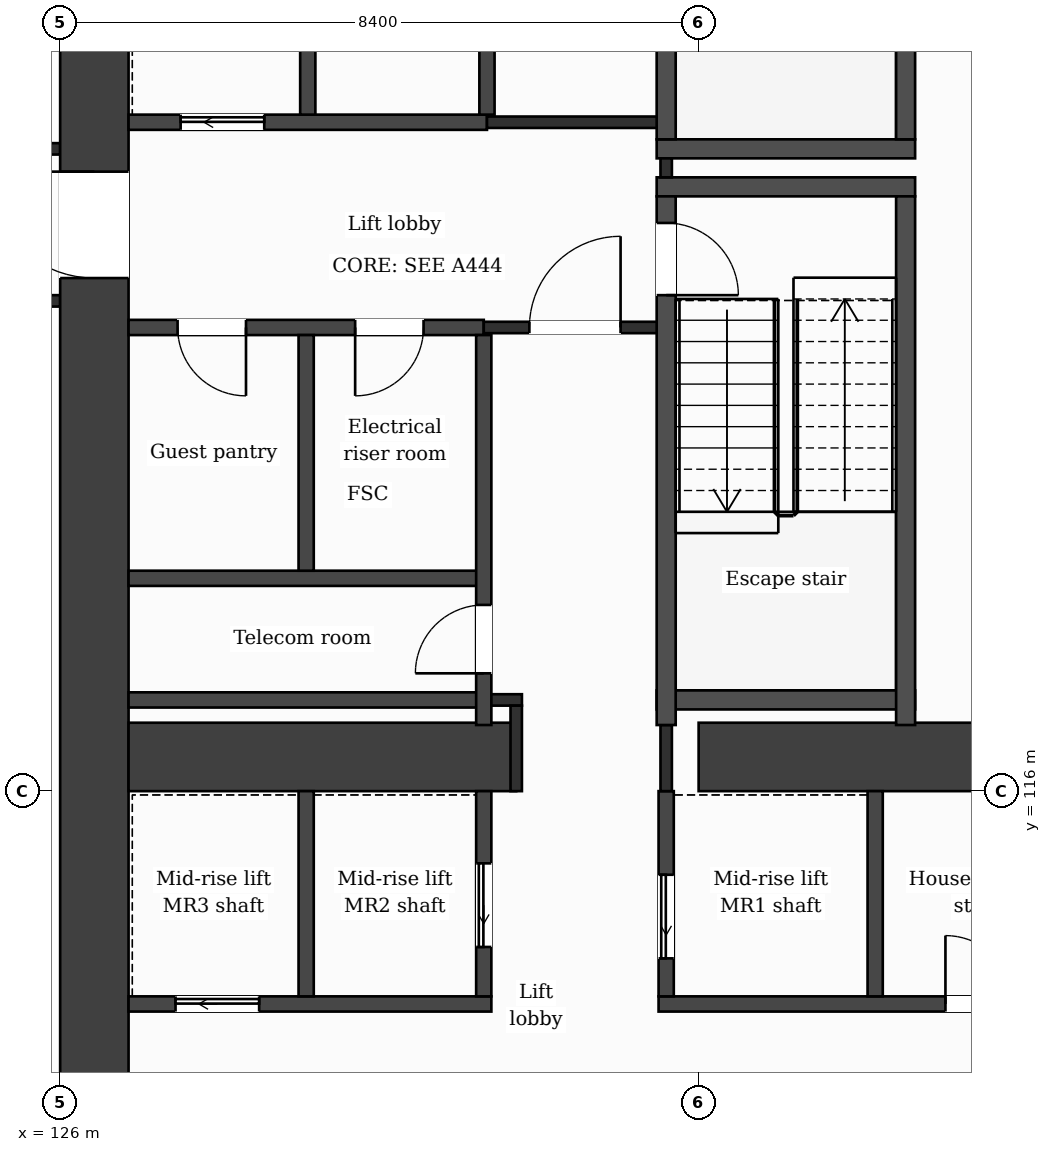
"""IFC4 building model, lengths in metres.
Left out: names, types, materials, properties, quantities, classifications, styles, units other than length and angle.
Written with IfcOpenShell. Run it as: python <this file> out.ifc"""

import sys

from ifc_helpers import new_model, si_unit, direction, frame, frame_2d, origin, place, context, subcontext, project, spatial, rectangle, extrude, element, fill, save


model = new_model("IFC4")
c1 = context("Model", 3, precision=1e-05, world=origin(), true_north=direction((0.0, 1.0)))
c2 = subcontext(c1, "Body", "Model", "MODEL_VIEW")
j1 = project(units=[si_unit("LENGTHUNIT", "METRE"), si_unit("PLANEANGLEUNIT", "RADIAN")], contexts=[c1])
p1 = place(None, origin())
s1 = spatial("IfcSite", under=j1, at=p1, CompositionType="ELEMENT")
p2 = place(p1, origin())
s2 = spatial("IfcBuilding", under=s1, at=p2, CompositionType="ELEMENT")
p3 = place(p2, frame((0.0, 0.0, 181.1)))
s3 = spatial("IfcBuildingStorey", under=s2, at=p3, CompositionType="ELEMENT", Elevation=181.1)
p4 = place(p3, frame((137.776, 131.95, 0.0), z_axis=(0.0, 0.0, 1.0), x_axis=(0.133421759112, -0.991059349482, 0.0)))
e1 = element("IfcWall", 1, at=p4, inside=s3, PredefinedType="SHEAR", context=c2, shape_type="SweptSolid", body=[
    extrude(rectangle(XDim=21.29, YDim=0.9, at=frame_2d((10.645, 0.0))), origin(), (0.0, 0.0, 1.0), 3.7),
])
p5 = place(p3, frame((126.45, 110.85, 0.0), z_axis=(0.0, 0.0, 1.0), x_axis=(0.0, 1.0, 0.0)))
e2 = element("IfcWall", 2, at=p5, inside=s3, PredefinedType="SHEAR", context=c2, shape_type="SweptSolid", body=[
    extrude(rectangle(XDim=21.1, YDim=0.9, at=frame_2d((10.55, 0.0))), origin(), (0.0, 0.0, 1.0), 3.7),
])
p6 = place(p5, frame((11.9, 0.0, 0.0)))
e3 = element("IfcOpeningElement", 3, at=p6, cuts=e2, PredefinedType="OPENING", context=c2, shape_type="SweptSolid", body=[
    extrude(rectangle(XDim=1.4, YDim=2.1, at=frame_2d((0.7, 1.05))), frame((0.0, 0.46, 0.0), z_axis=(0.0, -1.0, 0.0), x_axis=(1.0, 0.0, 0.0)), (0.0, 0.0, 1.0), 0.92),
])
p7 = place(p3, frame((126.9, 116.45, 0.0), z_axis=(0.0, 0.0, 1.0), x_axis=(1.0, 0.0, 0.0)))
e4 = element("IfcWall", 4, at=p7, inside=s3, PredefinedType="SHEAR", context=c2, shape_type="SweptSolid", body=[
    extrude(rectangle(XDim=5.1, YDim=0.9, at=frame_2d((2.55, 0.0))), origin(), (0.0, 0.0, 1.0), 3.7),
])
p8 = place(p3, frame((134.4, 116.45, 0.0), z_axis=(0.0, 0.0, 1.0), x_axis=(1.0, 0.0, 0.0)))
e5 = element("IfcWall", 5, at=p8, inside=s3, PredefinedType="SHEAR", context=c2, shape_type="SweptSolid", body=[
    extrude(rectangle(XDim=5.077, YDim=0.9, at=frame_2d((2.539, 0.0))), origin(), (0.0, 0.0, 1.0), 3.7),
])
p9 = place(p3, frame((126.9, 113.2, 0.0), z_axis=(0.0, 0.0, 1.0), x_axis=(1.0, 0.0, 0.0)))
e6 = element("IfcWall", 6, at=p9, inside=s3, PredefinedType="PARTITIONING", context=c2, shape_type="SweptSolid", body=[
    extrude(rectangle(XDim=4.773, YDim=0.2, at=frame_2d((2.387, 0.0))), origin(), (0.0, 0.0, 1.0), 3.38),
])
p10 = place(p9, frame((0.618, 0.0, 0.0)))
e7 = element("IfcOpeningElement", 7, at=p10, cuts=e6, PredefinedType="OPENING", context=c2, shape_type="SweptSolid", body=[
    extrude(rectangle(XDim=1.1, YDim=2.1, at=frame_2d((0.55, 1.05))), frame((0.0, 0.11, 0.0), z_axis=(0.0, -1.0, 0.0), x_axis=(1.0, 0.0, 0.0)), (0.0, 0.0, 1.0), 0.22),
])
p11 = place(p3, frame((133.873, 113.2, 0.0), z_axis=(0.0, 0.0, 1.0), x_axis=(1.0, 0.0, 0.0)))
e8 = element("IfcWall", 8, at=p11, inside=s3, PredefinedType="PARTITIONING", context=c2, shape_type="SweptSolid", body=[
    extrude(rectangle(XDim=6.003, YDim=0.2, at=frame_2d((3.001, 0.0))), origin(), (0.0, 0.0, 1.0), 3.38),
])
p12 = place(p11, frame((3.774, 0.0, 0.0)))
e9 = element("IfcOpeningElement", 9, at=p12, cuts=e8, PredefinedType="OPENING", context=c2, shape_type="SweptSolid", body=[
    extrude(rectangle(XDim=0.9, YDim=2.1, at=frame_2d((0.45, 1.05))), frame((0.0, 0.11, 0.0), z_axis=(0.0, -1.0, 0.0), x_axis=(1.0, 0.0, 0.0)), (0.0, 0.0, 1.0), 0.22),
])
p13 = place(p3, frame((126.9, 117.2, 0.0), z_axis=(0.0, 0.0, 1.0), x_axis=(1.0, 0.0, 0.0)))
e10 = element("IfcWall", 10, at=p13, inside=s3, PredefinedType="PARTITIONING", context=c2, shape_type="SweptSolid", body=[
    extrude(rectangle(XDim=4.673, YDim=0.2, at=frame_2d((2.336, 0.0))), origin(), (0.0, 0.0, 1.0), 3.38),
])
p14 = place(p3, frame((131.573, 117.2, 0.0), z_axis=(0.0, 0.0, 1.0), x_axis=(1.0, 0.0, 0.0)))
e11 = element("IfcWall", 11, at=p14, inside=s3, PredefinedType="PARTITIONING", context=c2, shape_type="SweptSolid", body=[
    extrude(rectangle(XDim=0.502, YDim=0.15, at=frame_2d((0.251, 0.0))), origin(), (0.0, 0.0, 1.0), 3.38),
])
p15 = place(p3, frame((133.848, 117.2, 0.0), z_axis=(0.0, 0.0, 1.0), x_axis=(1.0, 0.0, 0.0)))
e12 = element("IfcWall", 12, at=p15, inside=s3, PredefinedType="PARTITIONING", context=c2, shape_type="SweptSolid", body=[
    extrude(rectangle(XDim=3.4, YDim=0.25, at=frame_2d((1.7, 0.0))), origin(), (0.0, 0.0, 1.0), 3.38),
])
p16 = place(p3, frame((126.9, 118.8, 0.0), z_axis=(0.0, 0.0, 1.0), x_axis=(1.0, 0.0, 0.0)))
e13 = element("IfcWall", 13, at=p16, inside=s3, PredefinedType="PARTITIONING", context=c2, shape_type="SweptSolid", body=[
    extrude(rectangle(XDim=4.673, YDim=0.2, at=frame_2d((2.336, 0.0))), origin(), (0.0, 0.0, 1.0), 3.38),
])
p17 = place(p3, frame((126.9, 122.1, 0.0), z_axis=(0.0, 0.0, 1.0), x_axis=(1.0, 0.0, 0.0)))
e14 = element("IfcWall", 14, at=p17, inside=s3, PredefinedType="PARTITIONING", context=c2, shape_type="SweptSolid", body=[
    extrude(rectangle(XDim=4.673, YDim=0.2, at=frame_2d((2.336, 0.0))), origin(), (0.0, 0.0, 1.0), 3.38),
])
p18 = place(p17, frame((2.981, 0.0, 0.0)))
e15 = element("IfcOpeningElement", 15, at=p18, cuts=e14, PredefinedType="OPENING", context=c2, shape_type="SweptSolid", body=[
    extrude(rectangle(XDim=0.9, YDim=2.1, at=frame_2d((0.45, 1.05))), frame((0.0, 0.11, 0.0), z_axis=(0.0, -1.0, 0.0), x_axis=(1.0, 0.0, 0.0)), (0.0, 0.0, 1.0), 0.22),
])
p19 = place(p17, frame((0.645, 0.0, 0.0)))
e16 = element("IfcOpeningElement", 16, at=p19, cuts=e14, PredefinedType="OPENING", context=c2, shape_type="SweptSolid", body=[
    extrude(rectangle(XDim=0.9, YDim=2.1, at=frame_2d((0.45, 1.05))), frame((0.0, 0.11, 0.0), z_axis=(0.0, -1.0, 0.0), x_axis=(1.0, 0.0, 0.0)), (0.0, 0.0, 1.0), 0.22),
])
p20 = place(p3, frame((131.573, 122.1, 0.0), z_axis=(0.0, 0.0, 1.0), x_axis=(1.0, 0.0, 0.0)))
e17 = element("IfcWall", 17, at=p20, inside=s3, PredefinedType="PARTITIONING", context=c2, shape_type="SweptSolid", body=[
    extrude(rectangle(XDim=2.4, YDim=0.15, at=frame_2d((1.2, 0.0))), origin(), (0.0, 0.0, 1.0), 3.38),
])
p21 = place(p20, frame((0.6, 0.0, 0.0)))
e18 = element("IfcOpeningElement", 18, at=p21, cuts=e17, PredefinedType="OPENING", context=c2, shape_type="SweptSolid", body=[
    extrude(rectangle(XDim=1.2, YDim=2.1, at=frame_2d((0.6, 1.05))), frame((0.0, 0.085, 0.0), z_axis=(0.0, -1.0, 0.0), x_axis=(1.0, 0.0, 0.0)), (0.0, 0.0, 1.0), 0.17),
])
p22 = place(p3, frame((100.8, 122.45, 0.0), z_axis=(0.0, 0.0, 1.0), x_axis=(1.0, 0.0, 0.0)))
e19 = element("IfcWall", 19, at=p22, inside=s3, PredefinedType="PARTITIONING", context=c2, shape_type="SweptSolid", body=[
    extrude(rectangle(XDim=25.2, YDim=0.15, at=frame_2d((12.6, 0.0))), origin(), (0.0, 0.0, 1.0), 3.38),
])
for number, where, z_axis, x_axis in (
    (20, (133.848, 123.95, 0.0), (0.0, 0.0, 1.0), (1.0, 0.0, 0.0)),
    (21, (133.848, 124.45, 0.0), (0.0, 0.0, 1.0), (1.0, 0.0, 0.0)),
):
    element("IfcWall", number, at=place(p3, frame(where, z_axis=z_axis, x_axis=x_axis)), inside=s3, PredefinedType="PARTITIONING", context=c2, shape_type="SweptSolid", body=[
        extrude(rectangle(XDim=3.4, YDim=0.25, at=frame_2d((1.7, 0.0))), origin(), (0.0, 0.0, 1.0), 3.38),
    ])
p23 = place(p3, frame((100.8, 124.45, 0.0), z_axis=(0.0, 0.0, 1.0), x_axis=(1.0, 0.0, 0.0)))
e22 = element("IfcWall", 22, at=p23, inside=s3, PredefinedType="PARTITIONING", context=c2, shape_type="SweptSolid", body=[
    extrude(rectangle(XDim=25.2, YDim=0.15, at=frame_2d((12.6, 0.0))), origin(), (0.0, 0.0, 1.0), 3.38),
])
p24 = place(p23, frame((0.975, 0.0, 0.0)))
e23 = element("IfcOpeningElement", 23, at=p24, cuts=e22, PredefinedType="OPENING", context=c2, shape_type="SweptSolid", body=[
    extrude(rectangle(XDim=1.0, YDim=2.1, at=frame_2d((0.5, 1.05))), frame((0.0, 0.085, 0.0), z_axis=(0.0, -1.0, 0.0), x_axis=(1.0, 0.0, 0.0)), (0.0, 0.0, 1.0), 0.17),
])
p25 = place(p23, frame((6.05, 0.0, 0.0)))
e24 = element("IfcOpeningElement", 24, at=p25, cuts=e22, PredefinedType="OPENING", context=c2, shape_type="SweptSolid", body=[
    extrude(rectangle(XDim=1.0, YDim=2.1, at=frame_2d((0.5, 1.05))), frame((0.0, 0.085, 0.0), z_axis=(0.0, -1.0, 0.0), x_axis=(1.0, 0.0, 0.0)), (0.0, 0.0, 1.0), 0.17),
])
p26 = place(p23, frame((9.27, 0.0, 0.0)))
e25 = element("IfcOpeningElement", 25, at=p26, cuts=e22, PredefinedType="OPENING", context=c2, shape_type="SweptSolid", body=[
    extrude(rectangle(XDim=1.0, YDim=2.1, at=frame_2d((0.5, 1.05))), frame((0.0, 0.085, 0.0), z_axis=(0.0, -1.0, 0.0), x_axis=(1.0, 0.0, 0.0)), (0.0, 0.0, 1.0), 0.17),
])
p27 = place(p23, frame((14.2, 0.0, 0.0)))
e26 = element("IfcOpeningElement", 26, at=p27, cuts=e22, PredefinedType="OPENING", context=c2, shape_type="SweptSolid", body=[
    extrude(rectangle(XDim=1.0, YDim=2.1, at=frame_2d((0.5, 1.05))), frame((0.0, 0.085, 0.0), z_axis=(0.0, -1.0, 0.0), x_axis=(1.0, 0.0, 0.0)), (0.0, 0.0, 1.0), 0.17),
])
p28 = place(p23, frame((18.825, 0.0, 0.0)))
e27 = element("IfcOpeningElement", 27, at=p28, cuts=e22, PredefinedType="OPENING", context=c2, shape_type="SweptSolid", body=[
    extrude(rectangle(XDim=1.0, YDim=2.1, at=frame_2d((0.5, 1.05))), frame((0.0, 0.085, 0.0), z_axis=(0.0, -1.0, 0.0), x_axis=(1.0, 0.0, 0.0)), (0.0, 0.0, 1.0), 0.17),
])
p29 = place(p3, frame((126.9, 124.8, 0.0), z_axis=(0.0, 0.0, 1.0), x_axis=(1.0, 0.0, 0.0)))
e28 = element("IfcWall", 28, at=p29, inside=s3, PredefinedType="PARTITIONING", context=c2, shape_type="SweptSolid", body=[
    extrude(rectangle(XDim=4.715, YDim=0.2, at=frame_2d((2.358, 0.0))), origin(), (0.0, 0.0, 1.0), 3.38),
])
p30 = place(p29, frame((0.685, 0.0, 0.0)))
e29 = element("IfcOpeningElement", 29, at=p30, cuts=e28, PredefinedType="OPENING", context=c2, shape_type="SweptSolid", body=[
    extrude(rectangle(XDim=1.1, YDim=2.1, at=frame_2d((0.55, 1.05))), frame((0.0, 0.11, 0.0), z_axis=(0.0, -1.0, 0.0), x_axis=(1.0, 0.0, 0.0)), (0.0, 0.0, 1.0), 0.22),
])
p31 = place(p3, frame((131.615, 124.8, 0.0), z_axis=(0.0, 0.0, 1.0), x_axis=(1.0, 0.0, 0.0)))
e30 = element("IfcWall", 30, at=p31, inside=s3, PredefinedType="PARTITIONING", context=c2, shape_type="SweptSolid", body=[
    extrude(rectangle(XDim=2.483, YDim=0.15, at=frame_2d((1.241, 0.0))), origin(), (0.0, 0.0, 1.0), 3.38),
])
p32 = place(p3, frame((129.237, 113.3, 0.0), z_axis=(0.0, 0.0, 1.0), x_axis=(0.0, 1.0, 0.0)))
e31 = element("IfcWall", 31, at=p32, inside=s3, PredefinedType="PARTITIONING", context=c2, shape_type="SweptSolid", body=[
    extrude(rectangle(XDim=2.7, YDim=0.2, at=frame_2d((1.35, 0.0))), origin(), (0.0, 0.0, 1.0), 3.38),
])
for number, where, z_axis, x_axis in (
    (32, (129.237, 118.9, 0.0), (0.0, 0.0, 1.0), (0.0, 1.0, 0.0)),
    (33, (129.258, 124.9, 0.0), (0.0, 0.0, 1.0), (0.0, 1.0, 0.0)),
):
    element("IfcWall", number, at=place(p3, frame(where, z_axis=z_axis, x_axis=x_axis)), inside=s3, PredefinedType="PARTITIONING", context=c2, shape_type="SweptSolid", body=[
        extrude(rectangle(XDim=3.1, YDim=0.2, at=frame_2d((1.55, 0.0))), origin(), (0.0, 0.0, 1.0), 3.38),
    ])
p33 = place(p3, frame((131.573, 113.3, 0.0), z_axis=(0.0, 0.0, 1.0), x_axis=(0.0, 1.0, 0.0)))
e34 = element("IfcWall", 34, at=p33, inside=s3, PredefinedType="PARTITIONING", context=c2, shape_type="SweptSolid", body=[
    extrude(rectangle(XDim=2.7, YDim=0.2, at=frame_2d((1.35, 0.0))), origin(), (0.0, 0.0, 1.0), 3.38),
])
p34 = place(p33, frame((0.65, 0.0, 0.0)))
e35 = element("IfcOpeningElement", 35, at=p34, cuts=e34, PredefinedType="OPENING", context=c2, shape_type="SweptSolid", body=[
    extrude(rectangle(XDim=1.1, YDim=2.1, at=frame_2d((0.55, 1.05))), frame((0.0, 0.11, 0.0), z_axis=(0.0, -1.0, 0.0), x_axis=(1.0, 0.0, 0.0)), (0.0, 0.0, 1.0), 0.22),
])
p35 = place(p3, frame((131.573, 116.87, 0.0), z_axis=(0.0, 0.0, 1.0), x_axis=(0.0, 1.0, 0.0)))
e36 = element("IfcWall", 36, at=p35, inside=s3, PredefinedType="PARTITIONING", context=c2, shape_type="SweptSolid", body=[
    extrude(rectangle(XDim=5.13, YDim=0.2, at=frame_2d((2.565, 0.0))), origin(), (0.0, 0.0, 1.0), 3.38),
])
p36 = place(p35, frame((0.68, 0.0, 0.0)))
e37 = element("IfcOpeningElement", 37, at=p36, cuts=e36, PredefinedType="OPENING", context=c2, shape_type="SweptSolid", body=[
    extrude(rectangle(XDim=0.9, YDim=2.1, at=frame_2d((0.45, 1.05))), frame((0.0, 0.11, 0.0), z_axis=(0.0, -1.0, 0.0), x_axis=(1.0, 0.0, 0.0)), (0.0, 0.0, 1.0), 0.22),
])
p37 = place(p3, frame((131.615, 124.9, 0.0), z_axis=(0.0, 0.0, 1.0), x_axis=(0.0, 1.0, 0.0)))
e38 = element("IfcWall", 38, at=p37, inside=s3, PredefinedType="PARTITIONING", context=c2, shape_type="SweptSolid", body=[
    extrude(rectangle(XDim=3.1, YDim=0.2, at=frame_2d((1.55, 0.0))), origin(), (0.0, 0.0, 1.0), 3.38),
])
p38 = place(p3, frame((132.0, 116.0, 0.0), z_axis=(0.0, 0.0, 1.0), x_axis=(0.0, 1.0, 0.0)))
e39 = element("IfcWall", 39, at=p38, inside=s3, PredefinedType="PARTITIONING", context=c2, shape_type="SweptSolid", body=[
    extrude(rectangle(XDim=1.125, YDim=0.15, at=frame_2d((0.562, 0.0))), origin(), (0.0, 0.0, 1.0), 3.38),
])
p39 = place(p3, frame((133.973, 113.3, 0.0), z_axis=(0.0, 0.0, 1.0), x_axis=(0.0, 1.0, 0.0)))
e40 = element("IfcWall", 40, at=p39, inside=s3, PredefinedType="PARTITIONING", context=c2, shape_type="SweptSolid", body=[
    extrude(rectangle(XDim=2.7, YDim=0.2, at=frame_2d((1.35, 0.0))), origin(), (0.0, 0.0, 1.0), 3.38),
])
p40 = place(p39, frame((0.5, 0.0, 0.0)))
e41 = element("IfcOpeningElement", 41, at=p40, cuts=e40, PredefinedType="OPENING", context=c2, shape_type="SweptSolid", body=[
    extrude(rectangle(XDim=1.1, YDim=2.1, at=frame_2d((0.55, 1.05))), frame((0.0, 0.11, 0.0), z_axis=(0.0, -1.0, 0.0), x_axis=(1.0, 0.0, 0.0)), (0.0, 0.0, 1.0), 0.22),
])
p41 = place(p3, frame((133.973, 116.0, 0.0), z_axis=(0.0, 0.0, 1.0), x_axis=(0.0, 1.0, 0.0)))
e42 = element("IfcWall", 42, at=p41, inside=s3, PredefinedType="PARTITIONING", context=c2, shape_type="SweptSolid", body=[
    extrude(rectangle(XDim=0.87, YDim=0.15, at=frame_2d((0.435, 0.0))), origin(), (0.0, 0.0, 1.0), 3.38),
])
p42 = place(p3, frame((133.973, 124.075, 0.0), z_axis=(0.0, 0.0, 1.0), x_axis=(0.0, 1.0, 0.0)))
e43 = element("IfcWall", 43, at=p42, inside=s3, PredefinedType="PARTITIONING", context=c2, shape_type="SweptSolid", body=[
    extrude(rectangle(XDim=0.25, YDim=0.15, at=frame_2d((0.125, 0.0))), origin(), (0.0, 0.0, 1.0), 3.38),
])
p43 = place(p3, frame((133.973, 116.87, 0.0), z_axis=(0.0, 0.0, 1.0), x_axis=(0.0, 1.0, 0.0)))
e44 = element("IfcWall", 44, at=p43, inside=s3, PredefinedType="PARTITIONING", context=c2, shape_type="SweptSolid", body=[
    extrude(rectangle(XDim=6.955, YDim=0.25, at=frame_2d((3.478, 0.0))), origin(), (0.0, 0.0, 1.0), 3.38),
])
p44 = place(p43, frame((5.655, 0.0, 0.0)))
e45 = element("IfcOpeningElement", 45, at=p44, cuts=e44, PredefinedType="OPENING", context=c2, shape_type="SweptSolid", body=[
    extrude(rectangle(XDim=0.95, YDim=2.1, at=frame_2d((0.475, 1.05))), frame((0.0, 0.135, 0.0), z_axis=(0.0, -1.0, 0.0), x_axis=(1.0, 0.0, 0.0)), (0.0, 0.0, 1.0), 0.27),
])
p45 = place(p3, frame((133.973, 124.575, 0.0), z_axis=(0.0, 0.0, 1.0), x_axis=(0.0, 1.0, 0.0)))
e46 = element("IfcWall", 46, at=p45, inside=s3, PredefinedType="PARTITIONING", context=c2, shape_type="SweptSolid", body=[
    extrude(rectangle(XDim=6.955, YDim=0.25, at=frame_2d((3.478, 0.0))), origin(), (0.0, 0.0, 1.0), 3.38),
])
p46 = place(p45, frame((5.325, 0.0, 0.0)))
e47 = element("IfcOpeningElement", 47, at=p46, cuts=e46, PredefinedType="OPENING", context=c2, shape_type="SweptSolid", body=[
    extrude(rectangle(XDim=1.0, YDim=2.1, at=frame_2d((0.5, 1.05))), frame((0.0, 0.135, 0.0), z_axis=(0.0, -1.0, 0.0), x_axis=(1.0, 0.0, 0.0)), (0.0, 0.0, 1.0), 0.27),
])
p47 = place(p3, frame((136.722, 113.3, 0.0), z_axis=(0.0, 0.0, 1.0), x_axis=(0.0, 1.0, 0.0)))
e48 = element("IfcWall", 48, at=p47, inside=s3, PredefinedType="PARTITIONING", context=c2, shape_type="SweptSolid", body=[
    extrude(rectangle(XDim=2.7, YDim=0.2, at=frame_2d((1.35, 0.0))), origin(), (0.0, 0.0, 1.0), 3.38),
])
p48 = place(p3, frame((137.123, 116.87, 0.0), z_axis=(0.0, 0.0, 1.0), x_axis=(0.0, 1.0, 0.0)))
e49 = element("IfcWall", 49, at=p48, inside=s3, PredefinedType="PARTITIONING", context=c2, shape_type="SweptSolid", body=[
    extrude(rectangle(XDim=6.955, YDim=0.25, at=frame_2d((3.478, 0.0))), origin(), (0.0, 0.0, 1.0), 3.38),
])
p49 = place(p3, frame((137.123, 124.575, 0.0), z_axis=(0.0, 0.0, 1.0), x_axis=(0.0, 1.0, 0.0)))
e50 = element("IfcWall", 50, at=p49, inside=s3, PredefinedType="PARTITIONING", context=c2, shape_type="SweptSolid", body=[
    extrude(rectangle(XDim=6.955, YDim=0.25, at=frame_2d((3.478, 0.0))), origin(), (0.0, 0.0, 1.0), 3.38),
])
p50 = place(p21, origin())
e51 = element("IfcDoor", 51, at=p50, inside=s3, OperationType="SINGLE_SWING_RIGHT", PredefinedType="DOOR", context=c2, shape_type="SweptSolid", body=[
    extrude(rectangle(XDim=1.2, YDim=2.1, at=frame_2d((0.6, 1.05))), frame((0.0, 0.025, 0.0), z_axis=(0.0, -1.0, 0.0), x_axis=(1.0, 0.0, 0.0)), (0.0, 0.0, 1.0), 0.05),
])
fill(e18, e51)
p51 = place(p30, origin())
e52 = element("IfcDoor", 52, at=p51, inside=s3, OperationType="SLIDING_TO_LEFT", PredefinedType="DOOR", context=c2, shape_type="SweptSolid", body=[
    extrude(rectangle(XDim=1.1, YDim=2.1, at=frame_2d((0.55, 1.05))), frame((0.0, 0.025, 0.0), z_axis=(0.0, -1.0, 0.0), x_axis=(1.0, 0.0, 0.0)), (0.0, 0.0, 1.0), 0.05),
])
fill(e29, e52)
p52 = place(p18, origin())
e53 = element("IfcDoor", 53, at=p52, inside=s3, OperationType="SINGLE_SWING_LEFT", PredefinedType="DOOR", context=c2, shape_type="SweptSolid", body=[
    extrude(rectangle(XDim=0.9, YDim=2.1, at=frame_2d((0.45, 1.05))), frame((0.0, 0.025, 0.0), z_axis=(0.0, -1.0, 0.0), x_axis=(1.0, 0.0, 0.0)), (0.0, 0.0, 1.0), 0.05),
])
fill(e15, e53)
p53 = place(p19, origin())
e54 = element("IfcDoor", 54, at=p53, inside=s3, OperationType="SINGLE_SWING_RIGHT", PredefinedType="DOOR", context=c2, shape_type="SweptSolid", body=[
    extrude(rectangle(XDim=0.9, YDim=2.1, at=frame_2d((0.45, 1.05))), frame((0.0, 0.025, 0.0), z_axis=(0.0, -1.0, 0.0), x_axis=(1.0, 0.0, 0.0)), (0.0, 0.0, 1.0), 0.05),
])
fill(e16, e54)
p54 = place(p44, origin())
e55 = element("IfcDoor", 55, at=p54, inside=s3, OperationType="SINGLE_SWING_LEFT", PredefinedType="DOOR", context=c2, shape_type="SweptSolid", body=[
    extrude(rectangle(XDim=0.95, YDim=2.1, at=frame_2d((0.475, 1.05))), frame((0.0, 0.025, 0.0), z_axis=(0.0, -1.0, 0.0), x_axis=(1.0, 0.0, 0.0)), (0.0, 0.0, 1.0), 0.05),
])
fill(e45, e55)
p55 = place(p36, origin())
e56 = element("IfcDoor", 56, at=p55, inside=s3, OperationType="SINGLE_SWING_LEFT", PredefinedType="DOOR", context=c2, shape_type="SweptSolid", body=[
    extrude(rectangle(XDim=0.9, YDim=2.1, at=frame_2d((0.45, 1.05))), frame((0.0, 0.025, 0.0), z_axis=(0.0, -1.0, 0.0), x_axis=(1.0, 0.0, 0.0)), (0.0, 0.0, 1.0), 0.05),
])
fill(e37, e56)
p56 = place(p40, origin())
e57 = element("IfcDoor", 57, at=p56, inside=s3, OperationType="SLIDING_TO_LEFT", PredefinedType="DOOR", context=c2, shape_type="SweptSolid", body=[
    extrude(rectangle(XDim=1.1, YDim=2.1, at=frame_2d((0.55, 1.05))), frame((0.0, 0.025, 0.0), z_axis=(0.0, -1.0, 0.0), x_axis=(1.0, 0.0, 0.0)), (0.0, 0.0, 1.0), 0.05),
])
fill(e41, e57)
p57 = place(p34, origin())
e58 = element("IfcDoor", 58, at=p57, inside=s3, OperationType="SLIDING_TO_LEFT", PredefinedType="DOOR", context=c2, shape_type="SweptSolid", body=[
    extrude(rectangle(XDim=1.1, YDim=2.1, at=frame_2d((0.55, 1.05))), frame((0.0, 0.025, 0.0), z_axis=(0.0, -1.0, 0.0), x_axis=(1.0, 0.0, 0.0)), (0.0, 0.0, 1.0), 0.05),
])
fill(e35, e58)
p58 = place(p10, origin())
e59 = element("IfcDoor", 59, at=p58, inside=s3, OperationType="SLIDING_TO_LEFT", PredefinedType="DOOR", context=c2, shape_type="SweptSolid", body=[
    extrude(rectangle(XDim=1.1, YDim=2.1, at=frame_2d((0.55, 1.05))), frame((0.0, 0.025, 0.0), z_axis=(0.0, -1.0, 0.0), x_axis=(1.0, 0.0, 0.0)), (0.0, 0.0, 1.0), 0.05),
])
fill(e7, e59)
p59 = place(p12, origin())
e60 = element("IfcDoor", 60, at=p59, inside=s3, OperationType="SINGLE_SWING_LEFT", PredefinedType="DOOR", context=c2, shape_type="SweptSolid", body=[
    extrude(rectangle(XDim=0.9, YDim=2.1, at=frame_2d((0.45, 1.05))), frame((0.0, 0.025, 0.0), z_axis=(0.0, -1.0, 0.0), x_axis=(1.0, 0.0, 0.0)), (0.0, 0.0, 1.0), 0.05),
])
fill(e9, e60)
p60 = place(p6, origin())
e61 = element("IfcDoor", 61, at=p60, inside=s3, OperationType="SINGLE_SWING_RIGHT", PredefinedType="DOOR", context=c2, shape_type="SweptSolid", body=[
    extrude(rectangle(XDim=1.4, YDim=2.1, at=frame_2d((0.7, 1.05))), frame((0.0, 0.025, 0.0), z_axis=(0.0, -1.0, 0.0), x_axis=(1.0, 0.0, 0.0)), (0.0, 0.0, 1.0), 0.05),
])
fill(e3, e61)
save(model, sys.argv[1])
